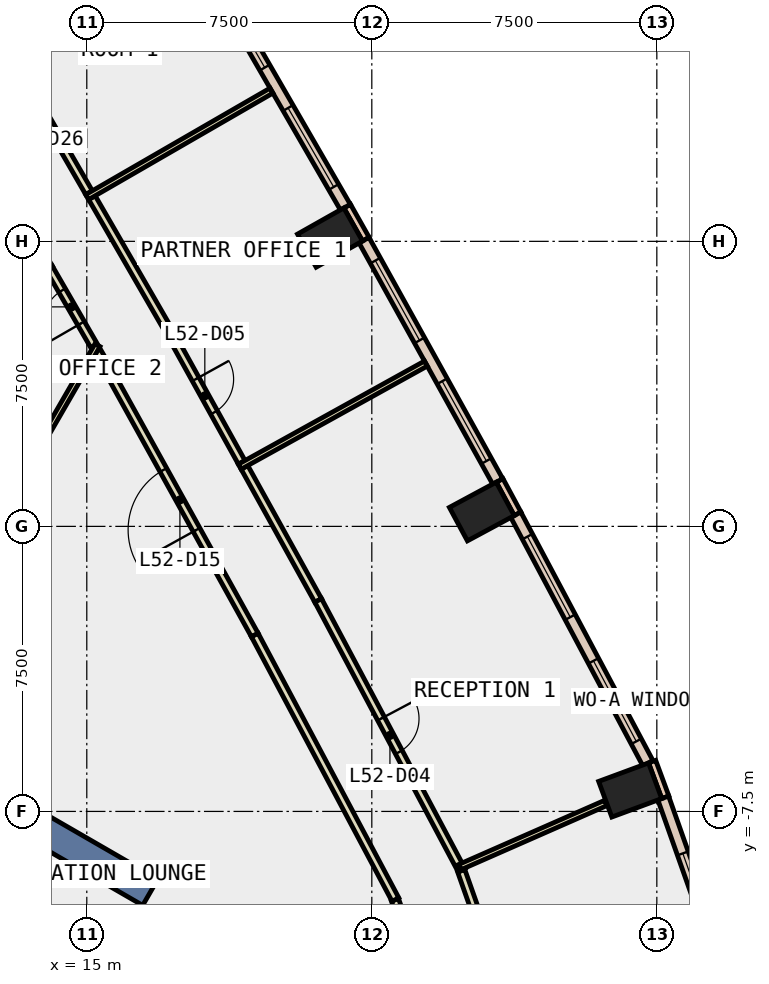
"""IFC4 building model, lengths in metres.
Left out: names, types, materials, properties, quantities, classifications, styles, units other than length and angle.
Written with IfcOpenShell. Run it as: python <this file> out.ifc"""

import sys

from ifc_helpers import new_model, si_unit, direction, frame, frame_2d, origin, origin_2d, place, context, subcontext, project, spatial, rectangle, extrude, element, fill, save


model = new_model("IFC4")
c1 = context("Model", 3, precision=1e-05, world=origin(), true_north=direction((0.0, 1.0)))
c2 = subcontext(c1, "Body", "Model", "MODEL_VIEW")
j1 = project(units=[si_unit("LENGTHUNIT", "METRE"), si_unit("PLANEANGLEUNIT", "RADIAN")], contexts=[c1])
p1 = place(None, origin())
s1 = spatial("IfcSite", under=j1, at=p1, CompositionType="ELEMENT")
p2 = place(p1, origin())
s2 = spatial("IfcBuilding", under=s1, at=p2, CompositionType="ELEMENT")
p3 = place(p2, frame((0.0, 0.0, 231.8)))
s3 = spatial("IfcBuildingStorey", under=s2, at=p3, CompositionType="ELEMENT", Elevation=231.8)
for number, where, z_axis, x_axis in (
    (1, (29.299, -6.936, -0.4), (0.0, 0.0, 1.0), (-0.347, 0.938, 0.0)),
    (2, (25.395, 0.391, -0.4), (0.0, 0.0, 1.0), (-0.474, 0.88, 0.0)),
    (3, (21.4, 7.599, -0.4), (0.0, 0.0, 1.0), (-0.491, 0.871, 0.0)),
):
    element("IfcColumn", number, at=place(p3, frame(where, z_axis=z_axis, x_axis=x_axis)), inside=s3, PredefinedType="COLUMN", context=c2, shape_type="SweptSolid", body=[
        extrude(rectangle(XDim=1.0, YDim=1.4, at=origin_2d()), origin(), (0.0, 0.0, 1.0), 4.0),
    ])
p4 = place(p3, frame((8.877, -5.125, -0.4), z_axis=(0.0, 0.0, 1.0), x_axis=(0.866017533419, -0.500013631625, 0.0)))
e4 = element("IfcWall", 4, at=p4, inside=s3, PredefinedType="SHEAR", context=c2, shape_type="SweptSolid", body=[
    extrude(rectangle(XDim=9.0, YDim=0.8, at=frame_2d((4.5, 0.0))), origin(), (0.0, 0.0, 1.0), 4.0),
])
p5 = place(p3, frame((30.223, -7.128, 0.0), z_axis=(0.0, 0.0, 1.0), x_axis=(-0.346892928577, 0.937904737222, 0.0)))
e5 = element("IfcWall", 5, at=p5, inside=s3, PredefinedType="STANDARD", context=c2, shape_type="SweptSolid", body=[
    extrude(rectangle(XDim=1.0, YDim=0.2, at=frame_2d((0.5, 0.0))), origin(), (0.0, 0.0, 1.0), 3.6),
])
p6 = place(p3, frame((26.336, 0.33, 0.0), z_axis=(0.0, 0.0, 1.0), x_axis=(-0.473765014438, 0.880651299377, 0.0)))
e6 = element("IfcWall", 6, at=p6, inside=s3, PredefinedType="STANDARD", context=c2, shape_type="SweptSolid", body=[
    extrude(rectangle(XDim=1.0, YDim=0.2, at=frame_2d((0.5, 0.0))), origin(), (0.0, 0.0, 1.0), 3.6),
])
p7 = place(p3, frame((22.343, 7.556, 0.0), z_axis=(0.0, 0.0, 1.0), x_axis=(-0.491743606947, 0.87074004446, 0.0)))
e7 = element("IfcWall", 7, at=p7, inside=s3, PredefinedType="STANDARD", context=c2, shape_type="SweptSolid", body=[
    extrude(rectangle(XDim=1.0, YDim=0.2, at=frame_2d((0.5, 0.0))), origin(), (0.0, 0.0, 1.0), 3.6),
])
p8 = place(p3, frame((31.666, -11.382, 0.0), z_axis=(0.0, 0.0, 1.0), x_axis=(-0.333280640478, 0.942827669663, 0.0)))
e8 = element("IfcWall", 8, at=p8, inside=s3, PredefinedType="STANDARD", context=c2, shape_type="SweptSolid", body=[
    extrude(rectangle(XDim=4.492, YDim=0.3, at=frame_2d((2.246, 0.0))), origin(), (0.0, 0.0, 1.0), 3.6),
])
p9 = place(p8, frame((1.546, 0.0, 0.9)))
e9 = element("IfcOpeningElement", 9, at=p9, cuts=e8, PredefinedType="OPENING", context=c2, shape_type="SweptSolid", body=[
    extrude(rectangle(XDim=1.4, YDim=2.6, at=frame_2d((0.7, 1.3))), frame((0.0, 0.16, 0.0), z_axis=(0.0, -1.0, 0.0), x_axis=(1.0, 0.0, 0.0)), (0.0, 0.0, 1.0), 0.32),
])
p10 = place(p3, frame((29.765, -6.232, 0.0), z_axis=(0.0, 0.0, 1.0), x_axis=(-0.469429229062, 0.882970100797, 0.0)))
e10 = element("IfcWall", 10, at=p10, inside=s3, PredefinedType="STANDARD", context=c2, shape_type="SweptSolid", body=[
    extrude(rectangle(XDim=7.404, YDim=0.3, at=frame_2d((3.702, 0.0))), origin(), (0.0, 0.0, 1.0), 3.6),
])
p11 = place(p10, frame((0.651, 0.0, 0.9)))
e11 = element("IfcOpeningElement", 11, at=p11, cuts=e10, PredefinedType="OPENING", context=c2, shape_type="SweptSolid", body=[
    extrude(rectangle(XDim=2.4, YDim=2.6, at=frame_2d((1.2, 1.3))), frame((0.0, 0.16, 0.0), z_axis=(0.0, -1.0, 0.0), x_axis=(1.0, 0.0, 0.0)), (0.0, 0.0, 1.0), 0.32),
])
p12 = place(p10, frame((4.353, 0.0, 0.9)))
e12 = element("IfcOpeningElement", 12, at=p12, cuts=e10, PredefinedType="OPENING", context=c2, shape_type="SweptSolid", body=[
    extrude(rectangle(XDim=2.4, YDim=2.6, at=frame_2d((1.2, 1.3))), frame((0.0, 0.16, 0.0), z_axis=(0.0, -1.0, 0.0), x_axis=(1.0, 0.0, 0.0)), (0.0, 0.0, 1.0), 0.32),
])
p13 = place(p3, frame((25.813, 1.183, 0.0), z_axis=(0.0, 0.0, 1.0), x_axis=(-0.484742980126, 0.874656643043, 0.0)))
e13 = element("IfcWall", 13, at=p13, inside=s3, PredefinedType="STANDARD", context=c2, shape_type="SweptSolid", body=[
    extrude(rectangle(XDim=7.258, YDim=0.3, at=frame_2d((3.629, 0.0))), origin(), (0.0, 0.0, 1.0), 3.6),
])
p14 = place(p13, frame((0.614, 0.0, 0.9)))
e14 = element("IfcOpeningElement", 14, at=p14, cuts=e13, PredefinedType="OPENING", context=c2, shape_type="SweptSolid", body=[
    extrude(rectangle(XDim=2.4, YDim=2.6, at=frame_2d((1.2, 1.3))), frame((0.0, 0.16, 0.0), z_axis=(0.0, -1.0, 0.0), x_axis=(1.0, 0.0, 0.0)), (0.0, 0.0, 1.0), 0.32),
])
p15 = place(p13, frame((4.243, 0.0, 0.9)))
e15 = element("IfcOpeningElement", 15, at=p15, cuts=e13, PredefinedType="OPENING", context=c2, shape_type="SweptSolid", body=[
    extrude(rectangle(XDim=2.4, YDim=2.6, at=frame_2d((1.2, 1.3))), frame((0.0, 0.16, 0.0), z_axis=(0.0, -1.0, 0.0), x_axis=(1.0, 0.0, 0.0)), (0.0, 0.0, 1.0), 0.32),
])
p16 = place(p3, frame((21.804, 8.399, 0.0), z_axis=(0.0, 0.0, 1.0), x_axis=(-0.500075798504, 0.865981637075, 0.0)))
e16 = element("IfcWall", 16, at=p16, inside=s3, PredefinedType="STANDARD", context=c2, shape_type="SweptSolid", body=[
    extrude(rectangle(XDim=7.257, YDim=0.3, at=frame_2d((3.628, 0.0))), origin(), (0.0, 0.0, 1.0), 3.6),
])
p17 = place(p16, frame((0.614, 0.0, 0.9)))
e17 = element("IfcOpeningElement", 17, at=p17, cuts=e16, PredefinedType="OPENING", context=c2, shape_type="SweptSolid", body=[
    extrude(rectangle(XDim=2.4, YDim=2.6, at=frame_2d((1.2, 1.3))), frame((0.0, 0.16, 0.0), z_axis=(0.0, -1.0, 0.0), x_axis=(1.0, 0.0, 0.0)), (0.0, 0.0, 1.0), 0.32),
])
p18 = place(p16, frame((4.242, 0.0, 0.9)))
e18 = element("IfcOpeningElement", 18, at=p18, cuts=e16, PredefinedType="OPENING", context=c2, shape_type="SweptSolid", body=[
    extrude(rectangle(XDim=2.4, YDim=2.6, at=frame_2d((1.2, 1.3))), frame((0.0, 0.16, 0.0), z_axis=(0.0, -1.0, 0.0), x_axis=(1.0, 0.0, 0.0)), (0.0, 0.0, 1.0), 0.32),
])
p19 = place(p3, frame((15.194, 4.747, 0.0), z_axis=(0.0, 0.0, 1.0), x_axis=(-0.500140598757, 0.865944213836, 0.0)))
e19 = element("IfcWall", 19, at=p19, inside=s3, PredefinedType="PARTITIONING", context=c2, shape_type="SweptSolid", body=[
    extrude(rectangle(XDim=2.375, YDim=0.2, at=frame_2d((1.188, 0.0))), origin(), (0.0, 0.0, 1.0), 3.6),
])
p20 = place(p19, frame((0.688, 0.0, 0.0)))
e20 = element("IfcOpeningElement", 20, at=p20, cuts=e19, PredefinedType="OPENING", context=c2, shape_type="SweptSolid", body=[
    extrude(rectangle(XDim=1.0, YDim=2.1, at=frame_2d((0.5, 1.05))), frame((0.0, 0.11, 0.0), z_axis=(0.0, -1.0, 0.0), x_axis=(1.0, 0.0, 0.0)), (0.0, 0.0, 1.0), 0.22),
])
p21 = place(p3, frame((24.04, -12.463, 0.0), z_axis=(0.0, 0.0, 1.0), x_axis=(-0.333166995935, 0.942867834227, 0.0)))
e21 = element("IfcWall", 21, at=p21, inside=s3, PredefinedType="PARTITIONING", context=c2, shape_type="SweptSolid", body=[
    extrude(rectangle(XDim=2.798, YDim=0.2, at=frame_2d((1.399, 0.0))), origin(), (0.0, 0.0, 1.0), 3.6),
])
p22 = place(p3, frame((23.121, -9.819, 0.0), z_axis=(0.0, 0.0, 1.0), x_axis=(-0.469450210487, 0.882958945746, 0.0)))
e22 = element("IfcWall", 22, at=p22, inside=s3, PredefinedType="PARTITIONING", context=c2, shape_type="SweptSolid", body=[
    extrude(rectangle(XDim=7.886, YDim=0.2, at=frame_2d((3.943, 0.0))), origin(), (0.0, 0.0, 1.0), 3.6),
])
p23 = place(p3, frame((19.419, -2.856, 0.0), z_axis=(0.0, 0.0, 1.0), x_axis=(-0.484683114876, 0.874689818252, 0.0)))
e23 = element("IfcWall", 23, at=p23, inside=s3, PredefinedType="PARTITIONING", context=c2, shape_type="SweptSolid", body=[
    extrude(rectangle(XDim=8.123, YDim=0.2, at=frame_2d((4.062, 0.0))), origin(), (0.0, 0.0, 1.0), 3.6),
])
p24 = place(p23, frame((3.161, 0.0, 0.0)))
e24 = element("IfcOpeningElement", 24, at=p24, cuts=e23, PredefinedType="OPENING", context=c2, shape_type="SweptSolid", body=[
    extrude(rectangle(XDim=1.8, YDim=2.1, at=frame_2d((0.9, 1.05))), frame((0.0, 0.11, 0.0), z_axis=(0.0, -1.0, 0.0), x_axis=(1.0, 0.0, 0.0)), (0.0, 0.0, 1.0), 0.22),
])
p25 = place(p3, frame((15.482, 4.249, 0.0), z_axis=(0.0, 0.0, 1.0), x_axis=(-0.500832493767, 0.865544229481, 0.0)))
e25 = element("IfcWall", 25, at=p25, inside=s3, PredefinedType="PARTITIONING", context=c2, shape_type="SweptSolid", body=[
    extrude(rectangle(XDim=0.425, YDim=0.2, at=frame_2d((0.212, 0.0))), origin(), (0.0, 0.0, 1.0), 3.6),
])
p26 = place(p3, frame((24.852, -9.059, 0.0), z_axis=(0.0, 0.0, 1.0), x_axis=(0.333116923704, -0.942885526001, 0.0)))
e26 = element("IfcWall", 26, at=p26, inside=s3, PredefinedType="PARTITIONING", context=c2, shape_type="SweptSolid", body=[
    extrude(rectangle(XDim=3.485, YDim=0.2, at=frame_2d((1.742, 0.0))), origin(), (0.0, 0.0, 1.0), 3.6),
])
p27 = place(p3, frame((19.149, 1.553, 0.0), z_axis=(0.0, 0.0, 1.0), x_axis=(0.484622593188, -0.874723351793, 0.0)))
e27 = element("IfcWall", 27, at=p27, inside=s3, PredefinedType="PARTITIONING", context=c2, shape_type="SweptSolid", body=[
    extrude(rectangle(XDim=4.003, YDim=0.2, at=frame_2d((2.002, 0.0))), origin(), (0.0, 0.0, 1.0), 3.6),
])
p28 = place(p3, frame((21.089, -1.949, 0.0), z_axis=(0.0, 0.0, 1.0), x_axis=(0.469431794586, -0.882968736837, 0.0)))
e28 = element("IfcWall", 28, at=p28, inside=s3, PredefinedType="PARTITIONING", context=c2, shape_type="SweptSolid", body=[
    extrude(rectangle(XDim=8.046, YDim=0.2, at=frame_2d((4.023, 0.0))), origin(), (0.0, 0.0, 1.0), 3.6),
])
p29 = place(p28, frame((3.522, 0.0, 0.0)))
e29 = element("IfcOpeningElement", 29, at=p29, cuts=e28, PredefinedType="OPENING", context=c2, shape_type="SweptSolid", body=[
    extrude(rectangle(XDim=1.0, YDim=2.1, at=frame_2d((0.5, 1.05))), frame((0.0, 0.11, 0.0), z_axis=(0.0, -1.0, 0.0), x_axis=(1.0, 0.0, 0.0)), (0.0, 0.0, 1.0), 0.22),
])
p30 = place(p3, frame((15.135, 8.65, 0.0), z_axis=(0.0, 0.0, 1.0), x_axis=(0.500102734445, -0.865966081899, 0.0)))
e30 = element("IfcWall", 30, at=p30, inside=s3, PredefinedType="PARTITIONING", context=c2, shape_type="SweptSolid", body=[
    extrude(rectangle(XDim=4.001, YDim=0.2, at=frame_2d((2.0, 0.0))), origin(), (0.0, 0.0, 1.0), 3.6),
])
p31 = place(p3, frame((17.136, 5.185, 0.0), z_axis=(0.0, 0.0, 1.0), x_axis=(0.484679349661, -0.874691904623, 0.0)))
e31 = element("IfcWall", 31, at=p31, inside=s3, PredefinedType="PARTITIONING", context=c2, shape_type="SweptSolid", body=[
    extrude(rectangle(XDim=4.002, YDim=0.2, at=frame_2d((2.001, 0.0))), origin(), (0.0, 0.0, 1.0), 3.6),
])
p32 = place(p31, frame((1.501, 0.0, 0.0)))
e32 = element("IfcOpeningElement", 32, at=p32, cuts=e31, PredefinedType="OPENING", context=c2, shape_type="SweptSolid", body=[
    extrude(rectangle(XDim=1.0, YDim=2.1, at=frame_2d((0.5, 1.05))), frame((0.0, 0.11, 0.0), z_axis=(0.0, -1.0, 0.0), x_axis=(1.0, 0.0, 0.0)), (0.0, 0.0, 1.0), 0.22),
])
p33 = place(p3, frame((13.057, 12.247, 0.0), z_axis=(0.0, 0.0, 1.0), x_axis=(0.500093699572, -0.865971299552, 0.0)))
e33 = element("IfcWall", 33, at=p33, inside=s3, PredefinedType="PARTITIONING", context=c2, shape_type="SweptSolid", body=[
    extrude(rectangle(XDim=4.004, YDim=0.2, at=frame_2d((2.002, 0.0))), origin(), (0.0, 0.0, 1.0), 3.6),
])
p34 = place(p3, frame((24.819, -8.964, 0.0), z_axis=(0.0, 0.0, 1.0), x_axis=(0.915460951187, 0.402406817602, 0.0)))
e34 = element("IfcWall", 34, at=p34, inside=s3, PredefinedType="PARTITIONING", context=c2, shape_type="SweptSolid", body=[
    extrude(rectangle(XDim=4.192, YDim=0.15, at=frame_2d((2.096, 0.0))), origin(), (0.0, 0.0, 1.0), 3.6),
])
p35 = place(p3, frame((19.025, 1.57, 0.0), z_axis=(0.0, 0.0, 1.0), x_axis=(0.874714019242, 0.484639437666, 0.0)))
e35 = element("IfcWall", 35, at=p35, inside=s3, PredefinedType="PARTITIONING", context=c2, shape_type="SweptSolid", body=[
    extrude(rectangle(XDim=5.6, YDim=0.15, at=frame_2d((2.8, 0.0))), origin(), (0.0, 0.0, 1.0), 3.6),
])
p36 = place(p3, frame((15.01, 8.665, 0.0), z_axis=(0.0, 0.0, 1.0), x_axis=(0.865961984968, 0.500109828528, 0.0)))
e36 = element("IfcWall", 36, at=p36, inside=s3, PredefinedType="PARTITIONING", context=c2, shape_type="SweptSolid", body=[
    extrude(rectangle(XDim=5.601, YDim=0.15, at=frame_2d((2.8, 0.0))), origin(), (0.0, 0.0, 1.0), 3.6),
])
p37 = place(p3, frame((9.597, -5.079, 0.0), z_axis=(0.0, 0.0, 1.0), x_axis=(0.499949193323, 0.866054735046, 0.0)))
e37 = element("IfcWall", 37, at=p37, inside=s3, PredefinedType="PARTITIONING", context=c2, shape_type="SweptSolid", body=[
    extrude(rectangle(XDim=11.371, YDim=0.15, at=frame_2d((5.686, 0.0))), origin(), (0.0, 0.0, 1.0), 3.6),
])
p38 = place(p9, origin())
e38 = element("IfcWindow", 38, at=p38, inside=s3, PartitioningType="SINGLE_PANEL", PredefinedType="WINDOW", context=c2, shape_type="SweptSolid", body=[
    extrude(rectangle(XDim=1.4, YDim=2.6, at=frame_2d((0.7, 1.3))), frame((0.0, 0.03, 0.0), z_axis=(0.0, -1.0, 0.0), x_axis=(1.0, 0.0, 0.0)), (0.0, 0.0, 1.0), 0.06),
])
fill(e9, e38)
p39 = place(p11, origin())
e39 = element("IfcWindow", 39, at=p39, inside=s3, PartitioningType="SINGLE_PANEL", PredefinedType="WINDOW", context=c2, shape_type="SweptSolid", body=[
    extrude(rectangle(XDim=2.4, YDim=2.6, at=frame_2d((1.2, 1.3))), frame((0.0, 0.03, 0.0), z_axis=(0.0, -1.0, 0.0), x_axis=(1.0, 0.0, 0.0)), (0.0, 0.0, 1.0), 0.06),
])
fill(e11, e39)
p40 = place(p12, origin())
e40 = element("IfcWindow", 40, at=p40, inside=s3, PartitioningType="SINGLE_PANEL", PredefinedType="WINDOW", context=c2, shape_type="SweptSolid", body=[
    extrude(rectangle(XDim=2.4, YDim=2.6, at=frame_2d((1.2, 1.3))), frame((0.0, 0.03, 0.0), z_axis=(0.0, -1.0, 0.0), x_axis=(1.0, 0.0, 0.0)), (0.0, 0.0, 1.0), 0.06),
])
fill(e12, e40)
p41 = place(p14, origin())
e41 = element("IfcWindow", 41, at=p41, inside=s3, PartitioningType="SINGLE_PANEL", PredefinedType="WINDOW", context=c2, shape_type="SweptSolid", body=[
    extrude(rectangle(XDim=2.4, YDim=2.6, at=frame_2d((1.2, 1.3))), frame((0.0, 0.03, 0.0), z_axis=(0.0, -1.0, 0.0), x_axis=(1.0, 0.0, 0.0)), (0.0, 0.0, 1.0), 0.06),
])
fill(e14, e41)
p42 = place(p15, origin())
e42 = element("IfcWindow", 42, at=p42, inside=s3, PartitioningType="SINGLE_PANEL", PredefinedType="WINDOW", context=c2, shape_type="SweptSolid", body=[
    extrude(rectangle(XDim=2.4, YDim=2.6, at=frame_2d((1.2, 1.3))), frame((0.0, 0.03, 0.0), z_axis=(0.0, -1.0, 0.0), x_axis=(1.0, 0.0, 0.0)), (0.0, 0.0, 1.0), 0.06),
])
fill(e15, e42)
p43 = place(p17, origin())
e43 = element("IfcWindow", 43, at=p43, inside=s3, PartitioningType="SINGLE_PANEL", PredefinedType="WINDOW", context=c2, shape_type="SweptSolid", body=[
    extrude(rectangle(XDim=2.4, YDim=2.6, at=frame_2d((1.2, 1.3))), frame((0.0, 0.03, 0.0), z_axis=(0.0, -1.0, 0.0), x_axis=(1.0, 0.0, 0.0)), (0.0, 0.0, 1.0), 0.06),
])
fill(e17, e43)
p44 = place(p18, origin())
e44 = element("IfcWindow", 44, at=p44, inside=s3, PartitioningType="SINGLE_PANEL", PredefinedType="WINDOW", context=c2, shape_type="SweptSolid", body=[
    extrude(rectangle(XDim=2.4, YDim=2.6, at=frame_2d((1.2, 1.3))), frame((0.0, 0.03, 0.0), z_axis=(0.0, -1.0, 0.0), x_axis=(1.0, 0.0, 0.0)), (0.0, 0.0, 1.0), 0.06),
])
fill(e18, e44)
p45 = place(p29, origin())
e45 = element("IfcDoor", 45, at=p45, inside=s3, OperationType="SINGLE_SWING_LEFT", PredefinedType="DOOR", context=c2, shape_type="SweptSolid", body=[
    extrude(rectangle(XDim=1.0, YDim=2.1, at=frame_2d((0.5, 1.05))), frame((0.0, 0.025, 0.0), z_axis=(0.0, -1.0, 0.0), x_axis=(1.0, 0.0, 0.0)), (0.0, 0.0, 1.0), 0.05),
])
fill(e29, e45)
p46 = place(p32, origin())
e46 = element("IfcDoor", 46, at=p46, inside=s3, OperationType="SINGLE_SWING_LEFT", PredefinedType="DOOR", context=c2, shape_type="SweptSolid", body=[
    extrude(rectangle(XDim=1.0, YDim=2.1, at=frame_2d((0.5, 1.05))), frame((0.0, 0.025, 0.0), z_axis=(0.0, -1.0, 0.0), x_axis=(1.0, 0.0, 0.0)), (0.0, 0.0, 1.0), 0.05),
])
fill(e32, e46)
p47 = place(p24, origin())
e47 = element("IfcDoor", 47, at=p47, inside=s3, OperationType="DOUBLE_DOOR_SINGLE_SWING", PredefinedType="DOOR", context=c2, shape_type="SweptSolid", body=[
    extrude(rectangle(XDim=1.8, YDim=2.1, at=frame_2d((0.9, 1.05))), frame((0.0, 0.025, 0.0), z_axis=(0.0, -1.0, 0.0), x_axis=(1.0, 0.0, 0.0)), (0.0, 0.0, 1.0), 0.05),
])
fill(e24, e47)
p48 = place(p20, origin())
e48 = element("IfcDoor", 48, at=p48, inside=s3, OperationType="SINGLE_SWING_LEFT", PredefinedType="DOOR", context=c2, shape_type="SweptSolid", body=[
    extrude(rectangle(XDim=1.0, YDim=2.1, at=frame_2d((0.5, 1.05))), frame((0.0, 0.025, 0.0), z_axis=(0.0, -1.0, 0.0), x_axis=(1.0, 0.0, 0.0)), (0.0, 0.0, 1.0), 0.05),
])
fill(e20, e48)
save(model, sys.argv[1])
